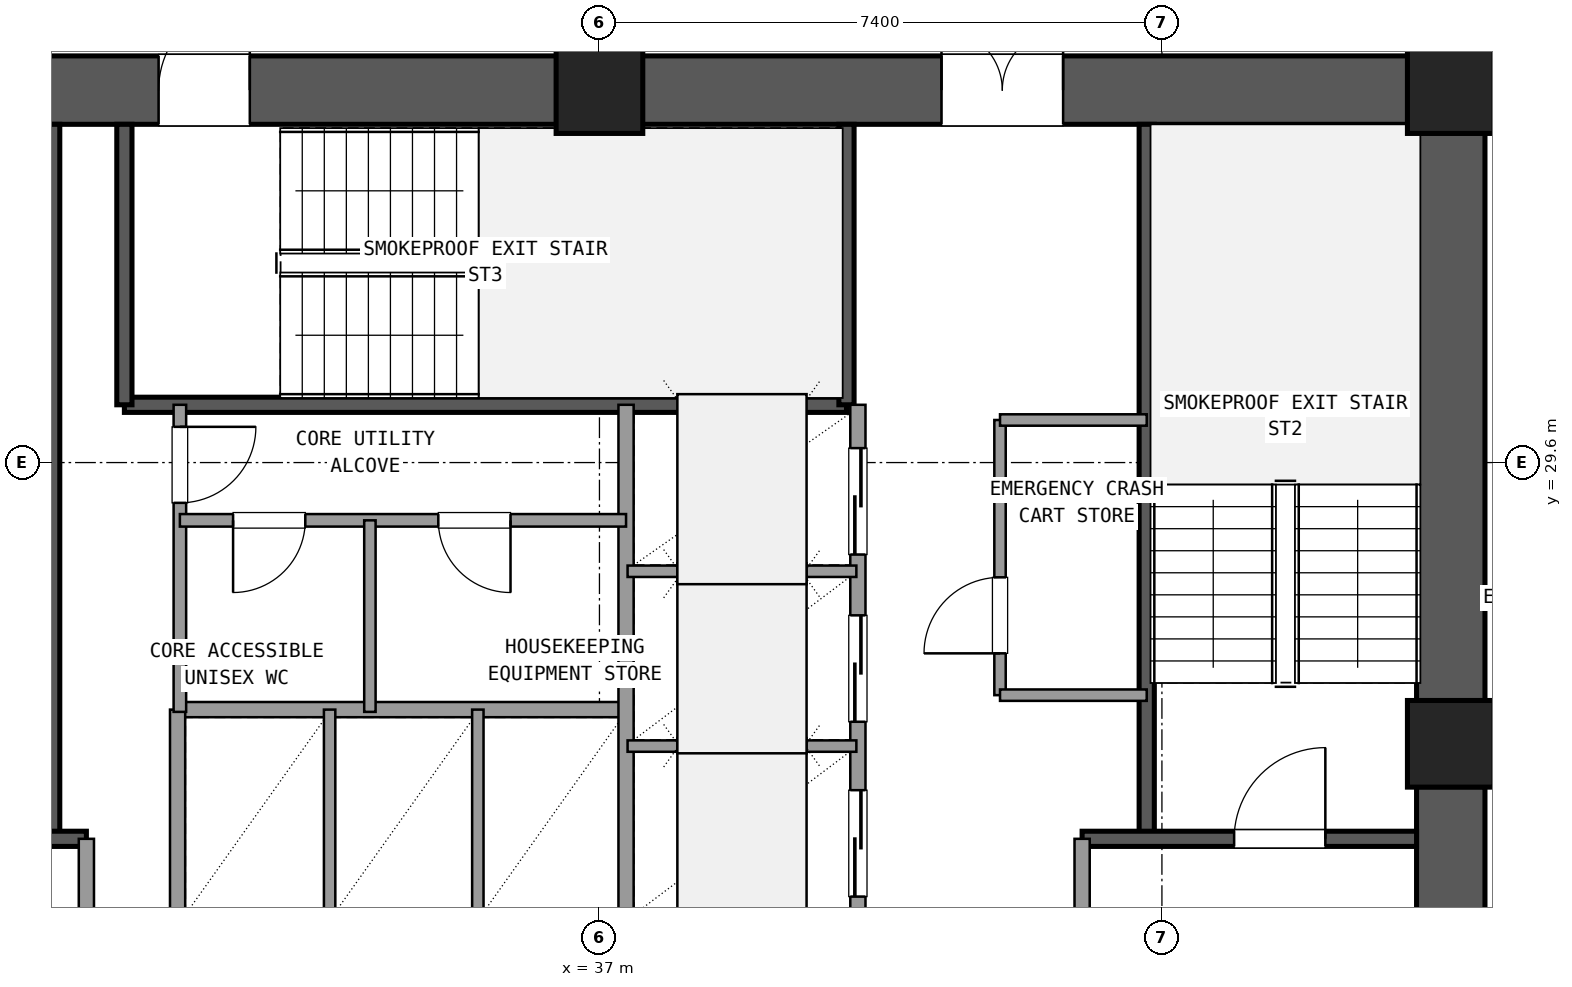
"""IFC4 building model, lengths in metres.
Left out: names, types, materials, properties, quantities, classifications, styles, units other than length and angle.
Written with IfcOpenShell. Run it as: python <this file> out.ifc"""

import sys

from ifc_helpers import new_model, si_unit, direction, frame, frame_2d, origin, origin_2d, place, context, subcontext, project, spatial, rectangle, extrude, element, fill, save


model = new_model("IFC4")
c1 = context("Model", 3, precision=1e-05, world=origin(), true_north=direction((0.0, 1.0)))
c2 = subcontext(c1, "Body", "Model", "MODEL_VIEW")
j1 = project(units=[si_unit("LENGTHUNIT", "METRE"), si_unit("PLANEANGLEUNIT", "RADIAN")], contexts=[c1])
p1 = place(None, origin())
s1 = spatial("IfcSite", under=j1, at=p1, CompositionType="ELEMENT")
p2 = place(p1, origin())
s2 = spatial("IfcBuilding", under=s1, at=p2, CompositionType="ELEMENT")
p3 = place(p2, frame((0.0, 0.0, 31.14)))
s3 = spatial("IfcBuildingStorey", under=s2, at=p3, CompositionType="ELEMENT", Elevation=31.14)
for number, where, z_axis, x_axis in (
    (1, (48.2, 25.9, 0.0), (0.0, 0.0, 1.0), (1.0, 0.0, 0.0)),
    (2, (48.2, 34.5, 0.0), (0.0, 0.0, 1.0), (1.0, 0.0, 0.0)),
    (3, (37.0, 34.5, 0.0), (0.0, 0.0, 1.0), (1.0, 0.0, 0.0)),
):
    element("IfcColumn", number, at=place(p3, frame(where, z_axis=z_axis, x_axis=x_axis)), inside=s3, PredefinedType="COLUMN", context=c2, shape_type="SweptSolid", body=[
        extrude(rectangle(XDim=1.14, YDim=1.14, at=origin_2d()), origin(), (0.0, 0.0, 1.0), 3.6),
    ])
p4 = place(p3, frame((48.2, 17.865, 0.0), z_axis=(0.0, 0.0, 1.0), x_axis=(0.0, 1.0, 0.0)))
e4 = element("IfcWall", 4, at=p4, inside=s3, PredefinedType="SHEAR", context=c2, shape_type="SweptSolid", body=[
    extrude(rectangle(XDim=7.47, YDim=0.9, at=frame_2d((3.735, 0.0))), origin(), (0.0, 0.0, 1.0), 3.32),
])
p5 = place(p4, frame((4.185, 0.0, 0.0)))
e5 = element("IfcOpeningElement", 5, at=p5, cuts=e4, PredefinedType="OPENING", context=c2, shape_type="SweptSolid", body=[
    extrude(rectangle(XDim=1.2, YDim=2.15, at=frame_2d((0.6, 1.075))), frame((0.0, 0.46, 0.0), z_axis=(0.0, -1.0, 0.0), x_axis=(1.0, 0.0, 0.0)), (0.0, 0.0, 1.0), 0.92),
])
p6 = place(p3, frame((48.2, 26.465, 0.0), z_axis=(0.0, 0.0, 1.0), x_axis=(0.0, 1.0, 0.0)))
e6 = element("IfcWall", 6, at=p6, inside=s3, PredefinedType="SHEAR", context=c2, shape_type="SweptSolid", body=[
    extrude(rectangle(XDim=7.47, YDim=0.9, at=frame_2d((3.735, 0.0))), origin(), (0.0, 0.0, 1.0), 3.32),
])
p7 = place(p3, frame((47.635, 34.5, 0.0), z_axis=(0.0, 0.0, 1.0), x_axis=(-1.0, 0.0, 0.0)))
e7 = element("IfcWall", 7, at=p7, inside=s3, PredefinedType="SHEAR", context=c2, shape_type="SweptSolid", body=[
    extrude(rectangle(XDim=10.07, YDim=0.9, at=frame_2d((5.035, 0.0))), origin(), (0.0, 0.0, 1.0), 3.32),
])
p8 = place(p7, frame((4.535, 0.0, 0.0)))
e8 = element("IfcOpeningElement", 8, at=p8, cuts=e7, PredefinedType="OPENING", context=c2, shape_type="SweptSolid", body=[
    extrude(rectangle(XDim=1.6, YDim=2.2, at=frame_2d((0.8, 1.1))), frame((0.0, 0.46, 0.0), z_axis=(0.0, -1.0, 0.0), x_axis=(1.0, 0.0, 0.0)), (0.0, 0.0, 1.0), 0.92),
])
p9 = place(p3, frame((36.435, 34.5, 0.0), z_axis=(0.0, 0.0, 1.0), x_axis=(-1.0, 0.0, 0.0)))
e9 = element("IfcWall", 9, at=p9, inside=s3, PredefinedType="SHEAR", context=c2, shape_type="SweptSolid", body=[
    extrude(rectangle(XDim=10.07, YDim=0.9, at=frame_2d((5.035, 0.0))), origin(), (0.0, 0.0, 1.0), 3.32),
])
p10 = place(p9, frame((4.035, 0.0, 0.0)))
e10 = element("IfcOpeningElement", 10, at=p10, cuts=e9, PredefinedType="OPENING", context=c2, shape_type="SweptSolid", body=[
    extrude(rectangle(XDim=1.2, YDim=2.15, at=frame_2d((0.6, 1.075))), frame((0.0, 0.46, 0.0), z_axis=(0.0, -1.0, 0.0), x_axis=(1.0, 0.0, 0.0)), (0.0, 0.0, 1.0), 0.92),
])
p11 = place(p3, frame((29.8, 24.65, 0.0), z_axis=(0.0, 0.0, 1.0), x_axis=(0.0, 1.0, 0.0)))
e11 = element("IfcWall", 11, at=p11, inside=s3, PredefinedType="SHEAR", context=c2, shape_type="SweptSolid", body=[
    extrude(rectangle(XDim=9.4, YDim=0.2, at=frame_2d((4.7, 0.0))), origin(), (0.0, 0.0, 1.0), 3.32),
])
p12 = place(p3, frame((26.25, 24.65, 0.0), z_axis=(0.0, 0.0, 1.0), x_axis=(1.0, 0.0, 0.0)))
e12 = element("IfcWall", 12, at=p12, inside=s3, PredefinedType="SHEAR", context=c2, shape_type="SweptSolid", body=[
    extrude(rectangle(XDim=4.0, YDim=0.2, at=frame_2d((2.0, 0.0))), origin(), (0.0, 0.0, 1.0), 3.32),
])
p13 = place(p12, frame((1.0, 0.0, 0.0)))
e13 = element("IfcOpeningElement", 13, at=p13, cuts=e12, PredefinedType="OPENING", context=c2, shape_type="SweptSolid", body=[
    extrude(rectangle(XDim=1.2, YDim=2.15, at=frame_2d((0.6, 1.075))), frame((0.0, 0.11, 0.0), z_axis=(0.0, -1.0, 0.0), x_axis=(1.0, 0.0, 0.0)), (0.0, 0.0, 1.0), 0.22),
])
p14 = place(p3, frame((44.2, 24.65, 0.0), z_axis=(0.0, 0.0, 1.0), x_axis=(0.0, 1.0, 0.0)))
e14 = element("IfcWall", 14, at=p14, inside=s3, PredefinedType="SHEAR", context=c2, shape_type="SweptSolid", body=[
    extrude(rectangle(XDim=9.4, YDim=0.2, at=frame_2d((4.7, 0.0))), origin(), (0.0, 0.0, 1.0), 3.32),
])
p15 = place(p3, frame((43.35, 24.65, 0.0), z_axis=(0.0, 0.0, 1.0), x_axis=(1.0, 0.0, 0.0)))
e15 = element("IfcWall", 15, at=p15, inside=s3, PredefinedType="SHEAR", context=c2, shape_type="SweptSolid", body=[
    extrude(rectangle(XDim=4.4, YDim=0.2, at=frame_2d((2.2, 0.0))), origin(), (0.0, 0.0, 1.0), 3.32),
])
p16 = place(p15, frame((2.0, 0.0, 0.0)))
e16 = element("IfcOpeningElement", 16, at=p16, cuts=e15, PredefinedType="OPENING", context=c2, shape_type="SweptSolid", body=[
    extrude(rectangle(XDim=1.2, YDim=2.15, at=frame_2d((0.6, 1.075))), frame((0.0, 0.11, 0.0), z_axis=(0.0, -1.0, 0.0), x_axis=(1.0, 0.0, 0.0)), (0.0, 0.0, 1.0), 0.22),
])
p17 = place(p3, frame((30.75, 30.36, 0.0), z_axis=(0.0, 0.0, 1.0), x_axis=(1.0, 0.0, 0.0)))
e17 = element("IfcWall", 17, at=p17, inside=s3, PredefinedType="SHEAR", context=c2, shape_type="SweptSolid", body=[
    extrude(rectangle(XDim=9.5, YDim=0.2, at=frame_2d((4.75, 0.0))), origin(), (0.0, 0.0, 1.0), 3.32),
])
for number, where, z_axis, x_axis in (
    (18, (30.75, 30.36, 0.0), (0.0, 0.0, 1.0), (0.0, 1.0, 0.0)),
    (19, (40.25, 30.36, 0.0), (0.0, 0.0, 1.0), (0.0, 1.0, 0.0)),
):
    element("IfcWall", number, at=place(p3, frame(where, z_axis=z_axis, x_axis=x_axis)), inside=s3, PredefinedType="SHEAR", context=c2, shape_type="SweptSolid", body=[
        extrude(rectangle(XDim=3.69, YDim=0.2, at=frame_2d((1.845, 0.0))), origin(), (0.0, 0.0, 1.0), 3.32),
    ])
p18 = place(p3, frame((30.25, 17.75, 0.0), z_axis=(0.0, 0.0, 1.0), x_axis=(0.0, 1.0, 0.0)))
e20 = element("IfcWall", 20, at=p18, inside=s3, PredefinedType="SOLIDWALL", context=c2, shape_type="SweptSolid", body=[
    extrude(rectangle(XDim=6.9, YDim=0.2, at=frame_2d((3.45, 0.0))), origin(), (0.0, 0.0, 1.0), 2.61),
])
p19 = place(p18, frame((4.15, 0.0, 0.0)))
e21 = element("IfcOpeningElement", 21, at=p19, cuts=e20, PredefinedType="OPENING", context=c2, shape_type="SweptSolid", body=[
    extrude(rectangle(XDim=1.2, YDim=2.15, at=frame_2d((0.6, 1.075))), frame((0.0, 0.11, 0.0), z_axis=(0.0, -1.0, 0.0), x_axis=(1.0, 0.0, 0.0)), (0.0, 0.0, 1.0), 0.22),
])
p20 = place(p3, frame((43.35, 17.75, 0.0), z_axis=(0.0, 0.0, 1.0), x_axis=(0.0, 1.0, 0.0)))
e22 = element("IfcWall", 22, at=p20, inside=s3, PredefinedType="SOLIDWALL", context=c2, shape_type="SweptSolid", body=[
    extrude(rectangle(XDim=6.9, YDim=0.2, at=frame_2d((3.45, 0.0))), origin(), (0.0, 0.0, 1.0), 2.61),
])
p21 = place(p20, frame((4.15, 0.0, 0.0)))
e23 = element("IfcOpeningElement", 23, at=p21, cuts=e22, PredefinedType="OPENING", context=c2, shape_type="SweptSolid", body=[
    extrude(rectangle(XDim=1.2, YDim=2.15, at=frame_2d((0.6, 1.075))), frame((0.0, 0.11, 0.0), z_axis=(0.0, -1.0, 0.0), x_axis=(1.0, 0.0, 0.0)), (0.0, 0.0, 1.0), 0.22),
])
p22 = place(p3, frame((31.45, 26.35, 0.0), z_axis=(0.0, 0.0, 1.0), x_axis=(1.0, 0.0, 0.0)))
e24 = element("IfcWall", 24, at=p22, inside=s3, PredefinedType="SOLIDWALL", context=c2, shape_type="SweptSolid", body=[
    extrude(rectangle(XDim=5.9, YDim=0.2, at=frame_2d((2.95, 0.0))), origin(), (0.0, 0.0, 1.0), 2.61),
])
p23 = place(p3, frame((31.45, 23.54, 0.0), z_axis=(0.0, 0.0, 1.0), x_axis=(0.0, 1.0, 0.0)))
e25 = element("IfcWall", 25, at=p23, inside=s3, PredefinedType="SOLIDWALL", context=c2, shape_type="SweptSolid", body=[
    extrude(rectangle(XDim=2.81, YDim=0.2, at=frame_2d((1.405, 0.0))), origin(), (0.0, 0.0, 1.0), 2.61),
])
for number, where, z_axis, x_axis in (
    (26, (33.45, 23.54, 0.0), (0.0, 0.0, 1.0), (0.0, 1.0, 0.0)),
    (27, (35.4, 23.54, 0.0), (0.0, 0.0, 1.0), (0.0, 1.0, 0.0)),
):
    element("IfcWall", number, at=place(p3, frame(where, z_axis=z_axis, x_axis=x_axis)), inside=s3, PredefinedType="PARTITIONING", context=c2, shape_type="SweptSolid", body=[
        extrude(rectangle(XDim=2.81, YDim=0.15, at=frame_2d((1.405, 0.0))), origin(), (0.0, 0.0, 1.0), 2.61),
    ])
p24 = place(p3, frame((37.35, 23.54, 0.0), z_axis=(0.0, 0.0, 1.0), x_axis=(0.0, 1.0, 0.0)))
e28 = element("IfcWall", 28, at=p24, inside=s3, PredefinedType="SOLIDWALL", context=c2, shape_type="SweptSolid", body=[
    extrude(rectangle(XDim=6.82, YDim=0.2, at=frame_2d((3.41, 0.0))), origin(), (0.0, 0.0, 1.0), 2.61),
])
p25 = place(p3, frame((40.4, 23.54, 0.0), z_axis=(0.0, 0.0, 1.0), x_axis=(0.0, 1.0, 0.0)))
e29 = element("IfcWall", 29, at=p25, inside=s3, PredefinedType="SOLIDWALL", context=c2, shape_type="SweptSolid", body=[
    extrude(rectangle(XDim=6.82, YDim=0.2, at=frame_2d((3.41, 0.0))), origin(), (0.0, 0.0, 1.0), 2.61),
])
p26 = place(p25, frame((0.35, 0.0, 0.0)))
e30 = element("IfcOpeningElement", 30, at=p26, cuts=e29, PredefinedType="OPENING", context=c2, shape_type="SweptSolid", body=[
    extrude(rectangle(XDim=1.4, YDim=2.2, at=frame_2d((0.7, 1.1))), frame((0.0, 0.11, 0.0), z_axis=(0.0, -1.0, 0.0), x_axis=(1.0, 0.0, 0.0)), (0.0, 0.0, 1.0), 0.22),
])
p27 = place(p25, frame((2.65, 0.0, 0.0)))
e31 = element("IfcOpeningElement", 31, at=p27, cuts=e29, PredefinedType="OPENING", context=c2, shape_type="SweptSolid", body=[
    extrude(rectangle(XDim=1.4, YDim=2.2, at=frame_2d((0.7, 1.1))), frame((0.0, 0.11, 0.0), z_axis=(0.0, -1.0, 0.0), x_axis=(1.0, 0.0, 0.0)), (0.0, 0.0, 1.0), 0.22),
])
p28 = place(p25, frame((4.85, 0.0, 0.0)))
e32 = element("IfcOpeningElement", 32, at=p28, cuts=e29, PredefinedType="OPENING", context=c2, shape_type="SweptSolid", body=[
    extrude(rectangle(XDim=1.4, YDim=2.2, at=frame_2d((0.7, 1.1))), frame((0.0, 0.11, 0.0), z_axis=(0.0, -1.0, 0.0), x_axis=(1.0, 0.0, 0.0)), (0.0, 0.0, 1.0), 0.22),
])
for number, where, z_axis, x_axis in (
    (33, (37.37, 25.87, 0.0), (0.0, 0.0, 1.0), (1.0, 0.0, 0.0)),
    (34, (37.37, 28.17, 0.0), (0.0, 0.0, 1.0), (1.0, 0.0, 0.0)),
):
    element("IfcWall", number, at=place(p3, frame(where, z_axis=z_axis, x_axis=x_axis)), inside=s3, PredefinedType="PARTITIONING", context=c2, shape_type="SweptSolid", body=[
        extrude(rectangle(XDim=3.01, YDim=0.15, at=frame_2d((1.505, 0.0))), origin(), (0.0, 0.0, 1.0), 2.61),
    ])
p29 = place(p3, frame((42.27, 26.54, 0.0), z_axis=(0.0, 0.0, 1.0), x_axis=(0.0, 1.0, 0.0)))
e35 = element("IfcWall", 35, at=p29, inside=s3, PredefinedType="PARTITIONING", context=c2, shape_type="SweptSolid", body=[
    extrude(rectangle(XDim=3.62, YDim=0.15, at=frame_2d((1.81, 0.0))), origin(), (0.0, 0.0, 1.0), 2.61),
])
p30 = place(p29, frame((0.55, 0.0, 0.0)))
e36 = element("IfcOpeningElement", 36, at=p30, cuts=e35, PredefinedType="OPENING", context=c2, shape_type="SweptSolid", body=[
    extrude(rectangle(XDim=1.0, YDim=2.15, at=frame_2d((0.5, 1.075))), frame((0.0, 0.085, 0.0), z_axis=(0.0, -1.0, 0.0), x_axis=(1.0, 0.0, 0.0)), (0.0, 0.0, 1.0), 0.17),
])
for number, where, z_axis, x_axis in (
    (37, (42.27, 26.54, 0.0), (0.0, 0.0, 1.0), (1.0, 0.0, 0.0)),
    (38, (42.27, 30.16, 0.0), (0.0, 0.0, 1.0), (1.0, 0.0, 0.0)),
):
    element("IfcWall", number, at=place(p3, frame(where, z_axis=z_axis, x_axis=x_axis)), inside=s3, PredefinedType="PARTITIONING", context=c2, shape_type="SweptSolid", body=[
        extrude(rectangle(XDim=1.93, YDim=0.15, at=frame_2d((0.965, 0.0))), origin(), (0.0, 0.0, 1.0), 2.61),
    ])
p31 = place(p3, frame((31.48, 26.32, 0.0), z_axis=(0.0, 0.0, 1.0), x_axis=(0.0, 1.0, 0.0)))
e39 = element("IfcWall", 39, at=p31, inside=s3, PredefinedType="PLUMBINGWALL", context=c2, shape_type="SweptSolid", body=[
    extrude(rectangle(XDim=4.04, YDim=0.165, at=frame_2d((2.02, 0.0))), origin(), (0.0, 0.0, 1.0), 2.61),
])
p32 = place(p31, frame((2.75, 0.0, 0.0)))
e40 = element("IfcOpeningElement", 40, at=p32, cuts=e39, PredefinedType="OPENING", context=c2, shape_type="SweptSolid", body=[
    extrude(rectangle(XDim=1.0, YDim=2.15, at=frame_2d((0.5, 1.075))), frame((0.0, 0.093, 0.0), z_axis=(0.0, -1.0, 0.0), x_axis=(1.0, 0.0, 0.0)), (0.0, 0.0, 1.0), 0.185),
])
p33 = place(p3, frame((31.48, 28.84, 0.0), z_axis=(0.0, 0.0, 1.0), x_axis=(1.0, 0.0, 0.0)))
e41 = element("IfcWall", 41, at=p33, inside=s3, PredefinedType="PLUMBINGWALL", context=c2, shape_type="SweptSolid", body=[
    extrude(rectangle(XDim=5.87, YDim=0.165, at=frame_2d((2.935, 0.0))), origin(), (0.0, 0.0, 1.0), 2.61),
])
p34 = place(p33, frame((0.7, 0.0, 0.0)))
e42 = element("IfcOpeningElement", 42, at=p34, cuts=e41, PredefinedType="OPENING", context=c2, shape_type="SweptSolid", body=[
    extrude(rectangle(XDim=0.95, YDim=2.1, at=frame_2d((0.475, 1.05))), frame((0.0, 0.093, 0.0), z_axis=(0.0, -1.0, 0.0), x_axis=(1.0, 0.0, 0.0)), (0.0, 0.0, 1.0), 0.185),
])
p35 = place(p33, frame((3.4, 0.0, 0.0)))
e43 = element("IfcOpeningElement", 43, at=p35, cuts=e41, PredefinedType="OPENING", context=c2, shape_type="SweptSolid", body=[
    extrude(rectangle(XDim=0.95, YDim=2.1, at=frame_2d((0.475, 1.05))), frame((0.0, 0.093, 0.0), z_axis=(0.0, -1.0, 0.0), x_axis=(1.0, 0.0, 0.0)), (0.0, 0.0, 1.0), 0.185),
])
p36 = place(p3, frame((33.98, 26.32, 0.0), z_axis=(0.0, 0.0, 1.0), x_axis=(0.0, 1.0, 0.0)))
e44 = element("IfcWall", 44, at=p36, inside=s3, PredefinedType="PARTITIONING", context=c2, shape_type="SweptSolid", body=[
    extrude(rectangle(XDim=2.52, YDim=0.15, at=frame_2d((1.26, 0.0))), origin(), (0.0, 0.0, 1.0), 2.61),
])
p37 = place(p3, frame((37.0, 34.95, 0.0), z_axis=(0.0, 0.0, 1.0), x_axis=(0.0, 1.0, 0.0)))
e45 = element("IfcWall", 45, at=p37, inside=s3, PredefinedType="PARTITIONING", context=c2, shape_type="SweptSolid", body=[
    extrude(rectangle(XDim=2.7, YDim=0.18, at=frame_2d((1.35, 0.0))), origin(), (0.0, 0.0, 1.0), 2.61),
])
p38 = place(p37, frame((0.35, 0.0, 0.0)))
e46 = element("IfcOpeningElement", 46, at=p38, cuts=e45, PredefinedType="OPENING", context=c2, shape_type="SweptSolid", body=[
    extrude(rectangle(XDim=2.0, YDim=2.2, at=frame_2d((1.0, 1.1))), frame((0.0, 0.1, 0.0), z_axis=(0.0, -1.0, 0.0), x_axis=(1.0, 0.0, 0.0)), (0.0, 0.0, 1.0), 0.2),
])
p39 = place(p16, origin())
e47 = element("IfcDoor", 47, at=p39, inside=s3, OperationType="SINGLE_SWING_RIGHT", PredefinedType="DOOR", context=c2, shape_type="SweptSolid", body=[
    extrude(rectangle(XDim=1.2, YDim=2.15, at=frame_2d((0.6, 1.075))), frame((0.0, 0.025, 0.0), z_axis=(0.0, -1.0, 0.0), x_axis=(1.0, 0.0, 0.0)), (0.0, 0.0, 1.0), 0.05),
])
fill(e16, e47)
p40 = place(p8, frame((1.6, 0.0, 0.0), z_axis=(0.0, 0.0, 1.0), x_axis=(-1.0, 0.0, 0.0)))
e48 = element("IfcDoor", 48, at=p40, inside=s3, OperationType="DOUBLE_DOOR_SINGLE_SWING", PredefinedType="DOOR", context=c2, shape_type="SweptSolid", body=[
    extrude(rectangle(XDim=1.6, YDim=2.2, at=frame_2d((0.8, 1.1))), frame((0.0, 0.025, 0.0), z_axis=(0.0, -1.0, 0.0), x_axis=(1.0, 0.0, 0.0)), (0.0, 0.0, 1.0), 0.05),
])
fill(e8, e48)
p41 = place(p10, frame((1.2, 0.0, 0.0), z_axis=(0.0, 0.0, 1.0), x_axis=(-1.0, 0.0, 0.0)))
e49 = element("IfcDoor", 49, at=p41, inside=s3, OperationType="SINGLE_SWING_LEFT", PredefinedType="DOOR", context=c2, shape_type="SweptSolid", body=[
    extrude(rectangle(XDim=1.2, YDim=2.15, at=frame_2d((0.6, 1.075))), frame((0.0, 0.025, 0.0), z_axis=(0.0, -1.0, 0.0), x_axis=(1.0, 0.0, 0.0)), (0.0, 0.0, 1.0), 0.05),
])
fill(e10, e49)
p42 = place(p26, origin())
e50 = element("IfcDoor", 50, at=p42, inside=s3, OperationType="SLIDING_TO_LEFT", PredefinedType="DOOR", context=c2, shape_type="SweptSolid", body=[
    extrude(rectangle(XDim=1.4, YDim=2.2, at=frame_2d((0.7, 1.1))), frame((0.0, 0.025, 0.0), z_axis=(0.0, -1.0, 0.0), x_axis=(1.0, 0.0, 0.0)), (0.0, 0.0, 1.0), 0.05),
])
fill(e30, e50)
p43 = place(p27, origin())
e51 = element("IfcDoor", 51, at=p43, inside=s3, OperationType="SLIDING_TO_LEFT", PredefinedType="DOOR", context=c2, shape_type="SweptSolid", body=[
    extrude(rectangle(XDim=1.4, YDim=2.2, at=frame_2d((0.7, 1.1))), frame((0.0, 0.025, 0.0), z_axis=(0.0, -1.0, 0.0), x_axis=(1.0, 0.0, 0.0)), (0.0, 0.0, 1.0), 0.05),
])
fill(e31, e51)
p44 = place(p28, origin())
e52 = element("IfcDoor", 52, at=p44, inside=s3, OperationType="SLIDING_TO_RIGHT", PredefinedType="DOOR", context=c2, shape_type="SweptSolid", body=[
    extrude(rectangle(XDim=1.4, YDim=2.2, at=frame_2d((0.7, 1.1))), frame((0.0, 0.025, 0.0), z_axis=(0.0, -1.0, 0.0), x_axis=(1.0, 0.0, 0.0)), (0.0, 0.0, 1.0), 0.05),
])
fill(e32, e52)
p45 = place(p30, origin())
e53 = element("IfcDoor", 53, at=p45, inside=s3, OperationType="SINGLE_SWING_LEFT", PredefinedType="DOOR", context=c2, shape_type="SweptSolid", body=[
    extrude(rectangle(XDim=1.0, YDim=2.15, at=frame_2d((0.5, 1.075))), frame((0.0, 0.025, 0.0), z_axis=(0.0, -1.0, 0.0), x_axis=(1.0, 0.0, 0.0)), (0.0, 0.0, 1.0), 0.05),
])
fill(e36, e53)
p46 = place(p32, frame((1.0, 0.0, 0.0), z_axis=(0.0, 0.0, 1.0), x_axis=(-1.0, 0.0, 0.0)))
e54 = element("IfcDoor", 54, at=p46, inside=s3, OperationType="SINGLE_SWING_RIGHT", PredefinedType="DOOR", context=c2, shape_type="SweptSolid", body=[
    extrude(rectangle(XDim=1.0, YDim=2.15, at=frame_2d((0.5, 1.075))), frame((0.0, 0.025, 0.0), z_axis=(0.0, -1.0, 0.0), x_axis=(1.0, 0.0, 0.0)), (0.0, 0.0, 1.0), 0.05),
])
fill(e40, e54)
p47 = place(p34, frame((0.95, 0.0, 0.0), z_axis=(0.0, 0.0, 1.0), x_axis=(-1.0, 0.0, 0.0)))
e55 = element("IfcDoor", 55, at=p47, inside=s3, OperationType="SINGLE_SWING_LEFT", PredefinedType="DOOR", context=c2, shape_type="SweptSolid", body=[
    extrude(rectangle(XDim=0.95, YDim=2.1, at=frame_2d((0.475, 1.05))), frame((0.0, 0.025, 0.0), z_axis=(0.0, -1.0, 0.0), x_axis=(1.0, 0.0, 0.0)), (0.0, 0.0, 1.0), 0.05),
])
fill(e42, e55)
p48 = place(p35, frame((0.95, 0.0, 0.0), z_axis=(0.0, 0.0, 1.0), x_axis=(-1.0, 0.0, 0.0)))
e56 = element("IfcDoor", 56, at=p48, inside=s3, OperationType="SINGLE_SWING_RIGHT", PredefinedType="DOOR", context=c2, shape_type="SweptSolid", body=[
    extrude(rectangle(XDim=0.95, YDim=2.1, at=frame_2d((0.475, 1.05))), frame((0.0, 0.025, 0.0), z_axis=(0.0, -1.0, 0.0), x_axis=(1.0, 0.0, 0.0)), (0.0, 0.0, 1.0), 0.05),
])
fill(e43, e56)
save(model, sys.argv[1])
